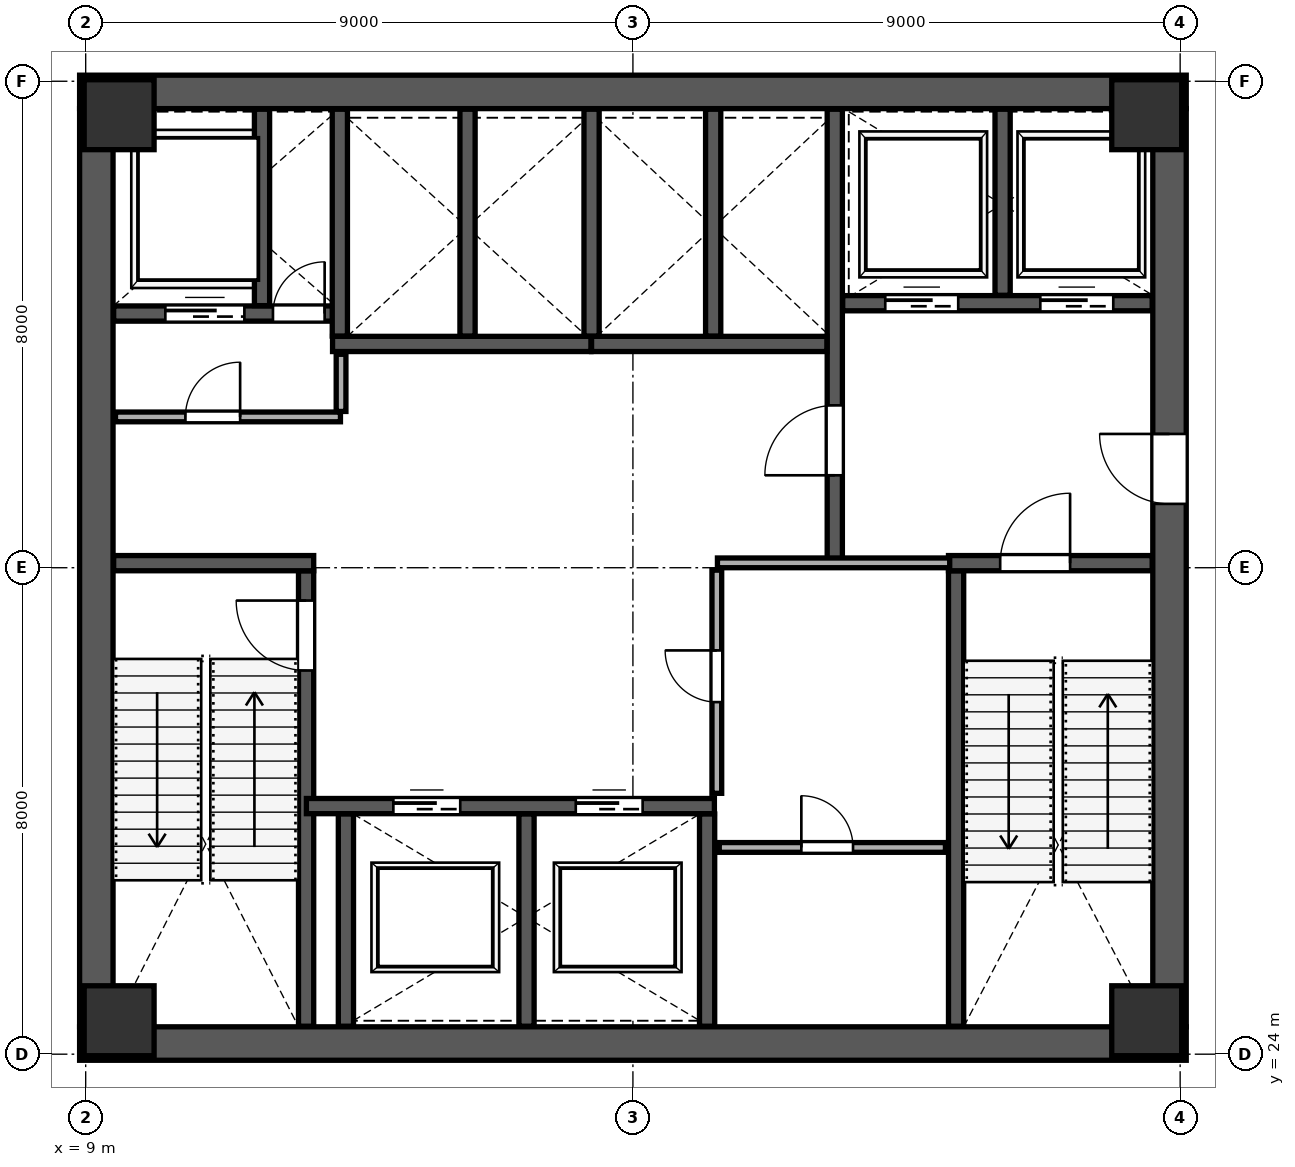
"""IFC4 building model, lengths in metres.
Left out: names, types, materials, properties, quantities, classifications, styles, units other than length and angle.
Written with IfcOpenShell. Run it as: python <this file> out.ifc"""

import sys

from ifc_helpers import new_model, si_unit, direction, frame, frame_2d, origin, origin_2d, place, context, subcontext, project, spatial, rectangle, extrude, source, transform, mapped, element, fill, save


model = new_model("IFC4")
c1 = context("Model", 3, precision=1e-05, world=origin(), true_north=direction((0.0, 1.0)))
c2 = subcontext(c1, "Body", "Model", "MODEL_VIEW")
j1 = project(units=[si_unit("LENGTHUNIT", "METRE"), si_unit("PLANEANGLEUNIT", "RADIAN")], contexts=[c1])
p1 = place(None, origin())
s1 = spatial("IfcSite", under=j1, at=p1, CompositionType="ELEMENT")
p2 = place(p1, origin())
s2 = spatial("IfcBuilding", under=s1, at=p2, CompositionType="ELEMENT")
p3 = place(p2, frame((0.0, 0.0, 42.4)))
s3 = spatial("IfcBuildingStorey", under=s2, at=p3, CompositionType="ELEMENT", Elevation=42.4)
m1 = source(origin(), c2, "Body", "SweptSolid", [
    extrude(rectangle(XDim=1.15, YDim=1.15, at=origin_2d()), origin(), (0.0, 0.0, 1.0), 4.799),
])
for number, where, z_axis, x_axis in (
    (1, (9.55, 24.55, 0.001), (0.0, 0.0, 1.0), (1.0, 0.0, 0.0)),
    (2, (26.45, 24.55, 0.001), (0.0, 0.0, 1.0), (1.0, 0.0, 0.0)),
    (3, (9.55, 39.45, 0.001), (0.0, 0.0, 1.0), (1.0, 0.0, 0.0)),
    (4, (26.45, 39.45, 0.001), (0.0, 0.0, 1.0), (1.0, 0.0, 0.0)),
):
    element("IfcColumn", number, at=place(p3, frame(where, z_axis=z_axis, x_axis=x_axis)), inside=s3, PredefinedType="COLUMN", context=c2, shape_type="MappedRepresentation", body=[
        mapped(m1, transform((0.0, 0.0, 0.0), scale=1.0)),
    ])
p4 = place(p3, frame((9.175, 24.45, 0.0), z_axis=(0.0, 0.0, 1.0), x_axis=(0.0, 1.0, 0.0)))
e5 = element("IfcWall", 5, at=p4, inside=s3, PredefinedType="SHEAR", context=c2, shape_type="SweptSolid", body=[
    extrude(rectangle(XDim=15.1, YDim=0.55, at=frame_2d((7.55, 0.0))), origin(), (0.0, 0.0, 1.0), 4.56),
])
p5 = place(p3, frame((26.825, 24.45, 0.0), z_axis=(0.0, 0.0, 1.0), x_axis=(0.0, 1.0, 0.0)))
e6 = element("IfcWall", 6, at=p5, inside=s3, PredefinedType="SHEAR", context=c2, shape_type="SweptSolid", body=[
    extrude(rectangle(XDim=15.1, YDim=0.55, at=frame_2d((7.55, 0.0))), origin(), (0.0, 0.0, 1.0), 4.56),
])
p6 = place(p5, frame((8.6, 0.0, 0.0)))
e7 = element("IfcOpeningElement", 7, at=p6, cuts=e6, PredefinedType="OPENING", context=c2, shape_type="SweptSolid", body=[
    extrude(rectangle(XDim=1.15, YDim=2.2, at=frame_2d((0.575, 1.1))), frame((0.0, 0.285, 0.0), z_axis=(0.0, -1.0, 0.0), x_axis=(1.0, 0.0, 0.0)), (0.0, 0.0, 1.0), 0.57),
])
for number, where, z_axis, x_axis in (
    (8, (8.9, 24.175, 0.0), (0.0, 0.0, 1.0), (1.0, 0.0, 0.0)),
    (9, (8.9, 39.825, 0.0), (0.0, 0.0, 1.0), (1.0, 0.0, 0.0)),
):
    element("IfcWall", number, at=place(p3, frame(where, z_axis=z_axis, x_axis=x_axis)), inside=s3, PredefinedType="SHEAR", context=c2, shape_type="SweptSolid", body=[
        extrude(rectangle(XDim=18.2, YDim=0.55, at=frame_2d((9.1, 0.0))), origin(), (0.0, 0.0, 1.0), 4.56),
    ])
p7 = place(p3, frame((12.625, 24.46, 0.0), z_axis=(0.0, 0.0, 1.0), x_axis=(0.0, 1.0, 0.0)))
e10 = element("IfcWall", 10, at=p7, inside=s3, PredefinedType="SHEAR", context=c2, shape_type="SweptSolid", body=[
    extrude(rectangle(XDim=7.49, YDim=0.25, at=frame_2d((3.745, 0.0))), origin(), (0.0, 0.0, 1.0), 4.56),
])
p8 = place(p7, frame((5.85, 0.0, 0.0)))
e11 = element("IfcOpeningElement", 11, at=p8, cuts=e10, PredefinedType="OPENING", context=c2, shape_type="SweptSolid", body=[
    extrude(rectangle(XDim=1.15, YDim=2.2, at=frame_2d((0.575, 1.1))), frame((0.0, 0.135, 0.0), z_axis=(0.0, -1.0, 0.0), x_axis=(1.0, 0.0, 0.0)), (0.0, 0.0, 1.0), 0.27),
])
p9 = place(p3, frame((9.46, 32.075, 0.0), z_axis=(0.0, 0.0, 1.0), x_axis=(1.0, 0.0, 0.0)))
e12 = element("IfcWall", 12, at=p9, inside=s3, PredefinedType="SHEAR", context=c2, shape_type="SweptSolid", body=[
    extrude(rectangle(XDim=3.29, YDim=0.25, at=frame_2d((1.645, 0.0))), origin(), (0.0, 0.0, 1.0), 4.56),
])
p10 = place(p3, frame((23.315, 24.46, 0.0), z_axis=(0.0, 0.0, 1.0), x_axis=(0.0, 1.0, 0.0)))
e13 = element("IfcWall", 13, at=p10, inside=s3, PredefinedType="SHEAR", context=c2, shape_type="SweptSolid", body=[
    extrude(rectangle(XDim=7.49, YDim=0.25, at=frame_2d((3.745, 0.0))), origin(), (0.0, 0.0, 1.0), 4.56),
])
p11 = place(p3, frame((23.19, 32.075, 0.0), z_axis=(0.0, 0.0, 1.0), x_axis=(1.0, 0.0, 0.0)))
e14 = element("IfcWall", 14, at=p11, inside=s3, PredefinedType="SHEAR", context=c2, shape_type="SweptSolid", body=[
    extrude(rectangle(XDim=3.35, YDim=0.25, at=frame_2d((1.675, 0.0))), origin(), (0.0, 0.0, 1.0), 4.56),
])
p12 = place(p11, frame((0.85, 0.0, 0.0)))
e15 = element("IfcOpeningElement", 15, at=p12, cuts=e14, PredefinedType="OPENING", context=c2, shape_type="SweptSolid", body=[
    extrude(rectangle(XDim=1.15, YDim=2.2, at=frame_2d((0.575, 1.1))), frame((0.0, 0.135, 0.0), z_axis=(0.0, -1.0, 0.0), x_axis=(1.0, 0.0, 0.0)), (0.0, 0.0, 1.0), 0.27),
])
p13 = place(p3, frame((21.32, 32.12, 0.0), z_axis=(0.0, 0.0, 1.0), x_axis=(0.0, 1.0, 0.0)))
e16 = element("IfcWall", 16, at=p13, inside=s3, PredefinedType="SHEAR", context=c2, shape_type="SweptSolid", body=[
    extrude(rectangle(XDim=7.42, YDim=0.25, at=frame_2d((3.71, 0.0))), origin(), (0.0, 0.0, 1.0), 4.56),
])
p14 = place(p13, frame((1.4, 0.0, 0.0)))
e17 = element("IfcOpeningElement", 17, at=p14, cuts=e16, PredefinedType="OPENING", context=c2, shape_type="SweptSolid", body=[
    extrude(rectangle(XDim=1.15, YDim=2.2, at=frame_2d((0.575, 1.1))), frame((0.0, 0.135, 0.0), z_axis=(0.0, -1.0, 0.0), x_axis=(1.0, 0.0, 0.0)), (0.0, 0.0, 1.0), 0.27),
])
p15 = place(p3, frame((9.46, 36.18, 0.0), z_axis=(0.0, 0.0, 1.0), x_axis=(1.0, 0.0, 0.0)))
e18 = element("IfcWall", 18, at=p15, inside=s3, PredefinedType="SHEAR", context=c2, shape_type="SweptSolid", body=[
    extrude(rectangle(XDim=3.79, YDim=0.25, at=frame_2d((1.895, 0.0))), origin(), (0.0, 0.0, 1.0), 4.56),
])
p16 = place(p15, frame((2.62, 0.0, 0.0)))
e19 = element("IfcOpeningElement", 19, at=p16, cuts=e18, PredefinedType="OPENING", context=c2, shape_type="SweptSolid", body=[
    extrude(rectangle(XDim=0.85, YDim=2.1, at=frame_2d((0.425, 1.05))), frame((0.0, 0.135, 0.0), z_axis=(0.0, -1.0, 0.0), x_axis=(1.0, 0.0, 0.0)), (0.0, 0.0, 1.0), 0.27),
])
p17 = place(p15, frame((0.85, 0.0, 0.0)))
e20 = element("IfcOpeningElement", 20, at=p17, cuts=e18, PredefinedType="OPENING", context=c2, shape_type="SweptSolid", body=[
    extrude(rectangle(XDim=1.3, YDim=2.25, at=frame_2d((0.65, 1.125))), frame((0.0, 0.135, 0.0), z_axis=(0.0, -1.0, 0.0), x_axis=(1.0, 0.0, 0.0)), (0.0, 0.0, 1.0), 0.27),
])
p18 = place(p3, frame((11.9, 36.31, 0.0), z_axis=(0.0, 0.0, 1.0), x_axis=(0.0, 1.0, 0.0)))
e21 = element("IfcWall", 21, at=p18, inside=s3, PredefinedType="SHEAR", context=c2, shape_type="SweptSolid", body=[
    extrude(rectangle(XDim=3.23, YDim=0.25, at=frame_2d((1.615, 0.0))), origin(), (0.0, 0.0, 1.0), 4.56),
])
p19 = place(p3, frame((21.45, 36.35, 0.0), z_axis=(0.0, 0.0, 1.0), x_axis=(1.0, 0.0, 0.0)))
e22 = element("IfcWall", 22, at=p19, inside=s3, PredefinedType="SHEAR", context=c2, shape_type="SweptSolid", body=[
    extrude(rectangle(XDim=5.09, YDim=0.25, at=frame_2d((2.545, 0.0))), origin(), (0.0, 0.0, 1.0), 4.56),
])
p20 = place(p19, frame((0.7, 0.0, 0.0)))
e23 = element("IfcOpeningElement", 23, at=p20, cuts=e22, PredefinedType="OPENING", context=c2, shape_type="SweptSolid", body=[
    extrude(rectangle(XDim=1.2, YDim=2.2, at=frame_2d((0.6, 1.1))), frame((0.0, 0.135, 0.0), z_axis=(0.0, -1.0, 0.0), x_axis=(1.0, 0.0, 0.0)), (0.0, 0.0, 1.0), 0.27),
])
p21 = place(p19, frame((3.25, 0.0, 0.0)))
e24 = element("IfcOpeningElement", 24, at=p21, cuts=e22, PredefinedType="OPENING", context=c2, shape_type="SweptSolid", body=[
    extrude(rectangle(XDim=1.2, YDim=2.2, at=frame_2d((0.6, 1.1))), frame((0.0, 0.135, 0.0), z_axis=(0.0, -1.0, 0.0), x_axis=(1.0, 0.0, 0.0)), (0.0, 0.0, 1.0), 0.27),
])
p22 = place(p3, frame((24.08, 36.48, 0.0), z_axis=(0.0, 0.0, 1.0), x_axis=(0.0, 1.0, 0.0)))
e25 = element("IfcWall", 25, at=p22, inside=s3, PredefinedType="SHEAR", context=c2, shape_type="SweptSolid", body=[
    extrude(rectangle(XDim=3.06, YDim=0.25, at=frame_2d((1.53, 0.0))), origin(), (0.0, 0.0, 1.0), 4.56),
])
p23 = place(p3, frame((12.63, 28.08, 0.0), z_axis=(0.0, 0.0, 1.0), x_axis=(1.0, 0.0, 0.0)))
e26 = element("IfcWall", 26, at=p23, inside=s3, PredefinedType="SHEAR", context=c2, shape_type="SweptSolid", body=[
    extrude(rectangle(XDim=6.71, YDim=0.25, at=frame_2d((3.355, 0.0))), origin(), (0.0, 0.0, 1.0), 4.56),
])
p24 = place(p23, frame((1.43, 0.0, 0.0)))
e27 = element("IfcOpeningElement", 27, at=p24, cuts=e26, PredefinedType="OPENING", context=c2, shape_type="SweptSolid", body=[
    extrude(rectangle(XDim=1.1, YDim=2.2, at=frame_2d((0.55, 1.1))), frame((0.0, 0.135, 0.0), z_axis=(0.0, -1.0, 0.0), x_axis=(1.0, 0.0, 0.0)), (0.0, 0.0, 1.0), 0.27),
])
p25 = place(p23, frame((4.43, 0.0, 0.0)))
e28 = element("IfcOpeningElement", 28, at=p25, cuts=e26, PredefinedType="OPENING", context=c2, shape_type="SweptSolid", body=[
    extrude(rectangle(XDim=1.1, YDim=2.2, at=frame_2d((0.55, 1.1))), frame((0.0, 0.135, 0.0), z_axis=(0.0, -1.0, 0.0), x_axis=(1.0, 0.0, 0.0)), (0.0, 0.0, 1.0), 0.27),
])
for number, where, z_axis, x_axis in (
    (29, (13.28, 24.46, 0.0), (0.0, 0.0, 1.0), (0.0, 1.0, 0.0)),
    (30, (16.25, 24.46, 0.0), (0.0, 0.0, 1.0), (0.0, 1.0, 0.0)),
    (31, (19.22, 24.46, 0.0), (0.0, 0.0, 1.0), (0.0, 1.0, 0.0)),
):
    element("IfcWall", number, at=place(p3, frame(where, z_axis=z_axis, x_axis=x_axis)), inside=s3, PredefinedType="SHEAR", context=c2, shape_type="SweptSolid", body=[
        extrude(rectangle(XDim=3.49, YDim=0.25, at=frame_2d((1.745, 0.0))), origin(), (0.0, 0.0, 1.0), 4.56),
    ])
p26 = place(p3, frame((13.06, 35.68, 0.0), z_axis=(0.0, 0.0, 1.0), x_axis=(1.0, 0.0, 0.0)))
e32 = element("IfcWall", 32, at=p26, inside=s3, PredefinedType="SHEAR", context=c2, shape_type="SweptSolid", body=[
    extrude(rectangle(XDim=4.25, YDim=0.25, at=frame_2d((2.125, 0.0))), origin(), (0.0, 0.0, 1.0), 4.56),
])
for number, where, z_axis, x_axis in (
    (33, (13.18, 35.81, 0.0), (0.0, 0.0, 1.0), (0.0, 1.0, 0.0)),
    (34, (15.28, 35.81, 0.0), (0.0, 0.0, 1.0), (0.0, 1.0, 0.0)),
):
    element("IfcWall", number, at=place(p3, frame(where, z_axis=z_axis, x_axis=x_axis)), inside=s3, PredefinedType="SHEAR", context=c2, shape_type="SweptSolid", body=[
        extrude(rectangle(XDim=3.73, YDim=0.25, at=frame_2d((1.865, 0.0))), origin(), (0.0, 0.0, 1.0), 4.56),
    ])
p27 = place(p3, frame((17.32, 35.68, 0.0), z_axis=(0.0, 0.0, 1.0), x_axis=(1.0, 0.0, 0.0)))
e35 = element("IfcWall", 35, at=p27, inside=s3, PredefinedType="SHEAR", context=c2, shape_type="SweptSolid", body=[
    extrude(rectangle(XDim=3.87, YDim=0.25, at=frame_2d((1.935, 0.0))), origin(), (0.0, 0.0, 1.0), 4.56),
])
for number, where, z_axis, x_axis in (
    (36, (17.32, 35.81, 0.0), (0.0, 0.0, 1.0), (0.0, 1.0, 0.0)),
    (37, (19.32, 35.81, 0.0), (0.0, 0.0, 1.0), (0.0, 1.0, 0.0)),
):
    element("IfcWall", number, at=place(p3, frame(where, z_axis=z_axis, x_axis=x_axis)), inside=s3, PredefinedType="SHEAR", context=c2, shape_type="SweptSolid", body=[
        extrude(rectangle(XDim=3.73, YDim=0.25, at=frame_2d((1.865, 0.0))), origin(), (0.0, 0.0, 1.0), 4.56),
    ])
p28 = place(p3, frame((9.49, 34.48, 0.0), z_axis=(0.0, 0.0, 1.0), x_axis=(1.0, 0.0, 0.0)))
e38 = element("IfcWall", 38, at=p28, inside=s3, PredefinedType="PARTITIONING", context=c2, shape_type="SweptSolid", body=[
    extrude(rectangle(XDim=3.7, YDim=0.16, at=frame_2d((1.85, 0.0))), origin(), (0.0, 0.0, 1.0), 4.56),
])
p29 = place(p28, frame((1.15, 0.0, 0.0)))
e39 = element("IfcOpeningElement", 39, at=p29, cuts=e38, PredefinedType="OPENING", context=c2, shape_type="SweptSolid", body=[
    extrude(rectangle(XDim=0.9, YDim=2.15, at=frame_2d((0.45, 1.075))), frame((0.0, 0.09, 0.0), z_axis=(0.0, -1.0, 0.0), x_axis=(1.0, 0.0, 0.0)), (0.0, 0.0, 1.0), 0.18),
])
p30 = place(p3, frame((13.2, 34.57, 0.0), z_axis=(0.0, 0.0, 1.0), x_axis=(0.0, 1.0, 0.0)))
e40 = element("IfcWall", 40, at=p30, inside=s3, PredefinedType="PARTITIONING", context=c2, shape_type="SweptSolid", body=[
    extrude(rectangle(XDim=0.94, YDim=0.16, at=frame_2d((0.47, 0.0))), origin(), (0.0, 0.0, 1.0), 4.56),
])
p31 = place(p3, frame((19.39, 32.08, 0.0), z_axis=(0.0, 0.0, 1.0), x_axis=(1.0, 0.0, 0.0)))
e41 = element("IfcWall", 41, at=p31, inside=s3, PredefinedType="PARTITIONING", context=c2, shape_type="SweptSolid", body=[
    extrude(rectangle(XDim=3.82, YDim=0.16, at=frame_2d((1.91, 0.0))), origin(), (0.0, 0.0, 1.0), 4.56),
])
p32 = place(p3, frame((19.38, 28.29, 0.0), z_axis=(0.0, 0.0, 1.0), x_axis=(0.0, 1.0, 0.0)))
e42 = element("IfcWall", 42, at=p32, inside=s3, PredefinedType="PARTITIONING", context=c2, shape_type="SweptSolid", body=[
    extrude(rectangle(XDim=3.67, YDim=0.16, at=frame_2d((1.835, 0.0))), origin(), (0.0, 0.0, 1.0), 4.56),
])
p33 = place(p32, frame((1.5, 0.0, 0.0)))
e43 = element("IfcOpeningElement", 43, at=p33, cuts=e42, PredefinedType="OPENING", context=c2, shape_type="SweptSolid", body=[
    extrude(rectangle(XDim=0.85, YDim=2.1, at=frame_2d((0.425, 1.05))), frame((0.0, 0.09, 0.0), z_axis=(0.0, -1.0, 0.0), x_axis=(1.0, 0.0, 0.0)), (0.0, 0.0, 1.0), 0.18),
])
p34 = place(p3, frame((19.42, 27.4, 0.0), z_axis=(0.0, 0.0, 1.0), x_axis=(1.0, 0.0, 0.0)))
e44 = element("IfcWall", 44, at=p34, inside=s3, PredefinedType="PARTITIONING", context=c2, shape_type="SweptSolid", body=[
    extrude(rectangle(XDim=3.72, YDim=0.16, at=frame_2d((1.86, 0.0))), origin(), (0.0, 0.0, 1.0), 4.56),
])
p35 = place(p34, frame((1.35, 0.0, 0.0)))
e45 = element("IfcOpeningElement", 45, at=p35, cuts=e44, PredefinedType="OPENING", context=c2, shape_type="SweptSolid", body=[
    extrude(rectangle(XDim=0.85, YDim=2.1, at=frame_2d((0.425, 1.05))), frame((0.0, 0.09, 0.0), z_axis=(0.0, -1.0, 0.0), x_axis=(1.0, 0.0, 0.0)), (0.0, 0.0, 1.0), 0.18),
])
m2 = source(origin(), c2, "Body", "SweptSolid", [
    extrude(rectangle(XDim=1.15, YDim=2.2, at=frame_2d((0.575, 1.1))), frame((0.0, 0.025, 0.0), z_axis=(0.0, -1.0, 0.0), x_axis=(1.0, 0.0, 0.0)), (0.0, 0.0, 1.0), 0.05),
])
p36 = place(p8, origin())
e46 = element("IfcDoor", 46, at=p36, inside=s3, OperationType="SINGLE_SWING_RIGHT", PredefinedType="DOOR", context=c2, shape_type="MappedRepresentation", body=[
    mapped(m2, transform((0.0, 0.0, 0.0), scale=1.0)),
])
fill(e11, e46)
m3 = source(origin(), c2, "Body", "SweptSolid", [
    extrude(rectangle(XDim=1.15, YDim=2.2, at=frame_2d((0.575, 1.1))), frame((0.0, 0.025, 0.0), z_axis=(0.0, -1.0, 0.0), x_axis=(1.0, 0.0, 0.0)), (0.0, 0.0, 1.0), 0.05),
])
p37 = place(p14, origin())
e47 = element("IfcDoor", 47, at=p37, inside=s3, OperationType="SINGLE_SWING_LEFT", PredefinedType="DOOR", context=c2, shape_type="MappedRepresentation", body=[
    mapped(m3, transform((0.0, 0.0, 0.0), scale=1.0)),
])
fill(e17, e47)
p38 = place(p12, origin())
e48 = element("IfcDoor", 48, at=p38, inside=s3, OperationType="SINGLE_SWING_RIGHT", PredefinedType="DOOR", context=c2, shape_type="MappedRepresentation", body=[
    mapped(m2, transform((0.0, 0.0, 0.0), scale=1.0)),
])
fill(e15, e48)
p39 = place(p6, origin())
e49 = element("IfcDoor", 49, at=p39, inside=s3, OperationType="SINGLE_SWING_RIGHT", PredefinedType="DOOR", context=c2, shape_type="MappedRepresentation", body=[
    mapped(m3, transform((0.0, 0.0, 0.0), scale=1.0)),
])
fill(e7, e49)
m4 = source(origin(), c2, "Body", "SweptSolid", [
    extrude(rectangle(XDim=0.85, YDim=2.1, at=frame_2d((0.425, 1.05))), frame((0.0, 0.025, 0.0), z_axis=(0.0, -1.0, 0.0), x_axis=(1.0, 0.0, 0.0)), (0.0, 0.0, 1.0), 0.05),
])
p40 = place(p16, origin())
e50 = element("IfcDoor", 50, at=p40, inside=s3, OperationType="SINGLE_SWING_RIGHT", PredefinedType="DOOR", context=c2, shape_type="MappedRepresentation", body=[
    mapped(m4, transform((0.0, 0.0, 0.0), scale=1.0)),
])
fill(e19, e50)
m5 = source(origin(), c2, "Body", "SweptSolid", [
    extrude(rectangle(XDim=1.1, YDim=2.2, at=frame_2d((0.55, 1.1))), frame((0.0, 0.025, 0.0), z_axis=(0.0, -1.0, 0.0), x_axis=(1.0, 0.0, 0.0)), (0.0, 0.0, 1.0), 0.05),
])
p41 = place(p24, origin())
e51 = element("IfcDoor", 51, at=p41, inside=s3, OperationType="SLIDING_TO_LEFT", PredefinedType="DOOR", context=c2, shape_type="MappedRepresentation", body=[
    mapped(m5, transform((0.0, 0.0, 0.0), scale=1.0)),
])
fill(e27, e51)
p42 = place(p25, origin())
e52 = element("IfcDoor", 52, at=p42, inside=s3, OperationType="SLIDING_TO_RIGHT", PredefinedType="DOOR", context=c2, shape_type="MappedRepresentation", body=[
    mapped(m5, transform((0.0, 0.0, 0.0), scale=1.0)),
])
fill(e28, e52)
m6 = source(origin(), c2, "Body", "SweptSolid", [
    extrude(rectangle(XDim=1.2, YDim=2.2, at=frame_2d((0.6, 1.1))), frame((0.0, 0.025, 0.0), z_axis=(0.0, -1.0, 0.0), x_axis=(1.0, 0.0, 0.0)), (0.0, 0.0, 1.0), 0.05),
])
p43 = place(p20, origin())
e53 = element("IfcDoor", 53, at=p43, inside=s3, OperationType="SLIDING_TO_LEFT", PredefinedType="DOOR", context=c2, shape_type="MappedRepresentation", body=[
    mapped(m6, transform((0.0, 0.0, 0.0), scale=1.0)),
])
fill(e23, e53)
p44 = place(p21, origin())
e54 = element("IfcDoor", 54, at=p44, inside=s3, OperationType="SLIDING_TO_RIGHT", PredefinedType="DOOR", context=c2, shape_type="MappedRepresentation", body=[
    mapped(m6, transform((0.0, 0.0, 0.0), scale=1.0)),
])
fill(e24, e54)
m7 = source(origin(), c2, "Body", "SweptSolid", [
    extrude(rectangle(XDim=1.3, YDim=2.25, at=frame_2d((0.65, 1.125))), frame((0.0, 0.025, 0.0), z_axis=(0.0, -1.0, 0.0), x_axis=(1.0, 0.0, 0.0)), (0.0, 0.0, 1.0), 0.05),
])
p45 = place(p17, origin())
e55 = element("IfcDoor", 55, at=p45, inside=s3, OperationType="SLIDING_TO_LEFT", PredefinedType="DOOR", context=c2, shape_type="MappedRepresentation", body=[
    mapped(m7, transform((0.0, 0.0, 0.0), scale=1.0)),
])
fill(e20, e55)
m8 = source(origin(), c2, "Body", "SweptSolid", [
    extrude(rectangle(XDim=0.9, YDim=2.15, at=frame_2d((0.45, 1.075))), frame((0.0, 0.025, 0.0), z_axis=(0.0, -1.0, 0.0), x_axis=(1.0, 0.0, 0.0)), (0.0, 0.0, 1.0), 0.05),
])
p46 = place(p29, origin())
e56 = element("IfcDoor", 56, at=p46, inside=s3, OperationType="SINGLE_SWING_RIGHT", PredefinedType="DOOR", context=c2, shape_type="MappedRepresentation", body=[
    mapped(m8, transform((0.0, 0.0, 0.0), scale=1.0)),
])
fill(e39, e56)
p47 = place(p35, origin())
e57 = element("IfcDoor", 57, at=p47, inside=s3, OperationType="SINGLE_SWING_LEFT", PredefinedType="DOOR", context=c2, shape_type="MappedRepresentation", body=[
    mapped(m4, transform((0.0, 0.0, 0.0), scale=1.0)),
])
fill(e45, e57)
p48 = place(p33, origin())
e58 = element("IfcDoor", 58, at=p48, inside=s3, OperationType="SINGLE_SWING_RIGHT", PredefinedType="DOOR", context=c2, shape_type="MappedRepresentation", body=[
    mapped(m4, transform((0.0, 0.0, 0.0), scale=1.0)),
])
fill(e43, e58)
save(model, sys.argv[1])
